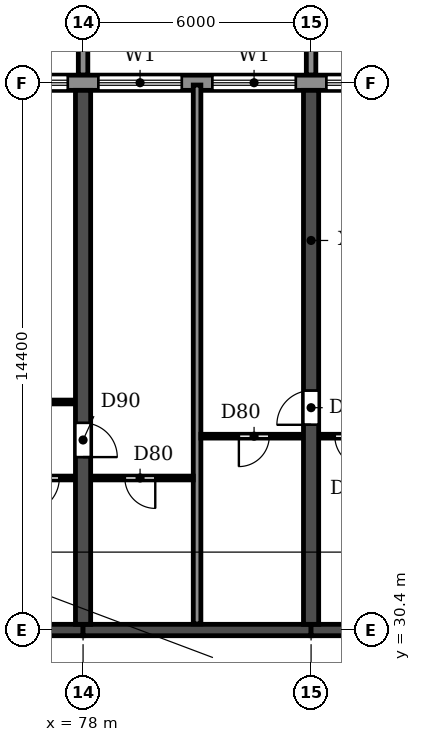
"""IFC4 building model, lengths in metres.
Left out: names, types, materials, properties, quantities, classifications, styles, units other than length and angle.
Written with IfcOpenShell. Run it as: python <this file> out.ifc"""

import sys

from ifc_helpers import new_model, si_unit, direction, frame, frame_2d, origin, place, context, subcontext, project, spatial, polyline, rectangle, outline, extrude, source, transform, mapped, element, fill, save


model = new_model("IFC4")
c1 = context("Model", 3, precision=1e-05, world=origin(), true_north=direction((0.0, 1.0)))
c2 = subcontext(c1, "Body", "Model", "MODEL_VIEW")
j1 = project(units=[si_unit("LENGTHUNIT", "METRE"), si_unit("PLANEANGLEUNIT", "RADIAN")], contexts=[c1])
p1 = place(None, origin())
s1 = spatial("IfcSite", under=j1, at=p1, CompositionType="ELEMENT")
p2 = place(p1, origin())
s2 = spatial("IfcBuilding", under=s1, at=p2, CompositionType="ELEMENT")
p3 = place(p2, frame((0.0, 0.0, 43.2)))
s3 = spatial("IfcBuildingStorey", under=s2, at=p3, CompositionType="ELEMENT", Elevation=43.2)
p4 = place(p3, frame((78.0, 30.55, 0.0), z_axis=(0.0, 0.0, 1.0), x_axis=(0.0, 1.0, 0.0)))
e1 = element("IfcWall", 1, at=p4, inside=s3, PredefinedType="SHEAR", context=c2, shape_type="SweptSolid", body=[
    extrude(rectangle(XDim=14.05, YDim=0.4, at=frame_2d((7.025, 0.0))), origin(), (0.0, 0.0, 1.0), 3.05),
])
p5 = place(p4, frame((4.4, 0.0, 0.0)))
e2 = element("IfcOpeningElement", 2, at=p5, cuts=e1, PredefinedType="OPENING", context=c2, shape_type="SweptSolid", body=[
    extrude(rectangle(XDim=0.9, YDim=2.1, at=frame_2d((0.45, 1.05))), frame((0.0, 0.21, 0.0), z_axis=(0.0, -1.0, 0.0), x_axis=(1.0, 0.0, 0.0)), (0.0, 0.0, 1.0), 0.42),
])
p6 = place(p3, frame((84.0, 30.55, 0.0), z_axis=(0.0, 0.0, 1.0), x_axis=(0.0, 1.0, 0.0)))
e3 = element("IfcWall", 3, at=p6, inside=s3, PredefinedType="SHEAR", context=c2, shape_type="SweptSolid", body=[
    extrude(rectangle(XDim=14.05, YDim=0.4, at=frame_2d((7.025, 0.0))), origin(), (0.0, 0.0, 1.0), 3.05),
])
p7 = place(p6, frame((5.25, 0.0, 0.0)))
e4 = element("IfcOpeningElement", 4, at=p7, cuts=e3, PredefinedType="OPENING", context=c2, shape_type="SweptSolid", body=[
    extrude(rectangle(XDim=0.9, YDim=2.1, at=frame_2d((0.45, 1.05))), frame((0.0, 0.21, 0.0), z_axis=(0.0, -1.0, 0.0), x_axis=(1.0, 0.0, 0.0)), (0.0, 0.0, 1.0), 0.42),
])
p8 = place(p3, frame((72.0, 30.4, 0.0), z_axis=(0.0, 0.0, 1.0), x_axis=(1.0, 0.0, 0.0)))
e5 = element("IfcWall", 5, at=p8, inside=s3, PredefinedType="SHEAR", context=c2, shape_type="SweptSolid", body=[
    extrude(rectangle(XDim=6.0, YDim=0.3, at=frame_2d((3.0, 0.0))), origin(), (0.0, 0.0, 1.0), 2.45),
])
p9 = place(p8, frame((2.45, 0.0, 0.0)))
e6 = element("IfcOpeningElement", 6, at=p9, cuts=e5, PredefinedType="OPENING", context=c2, shape_type="SweptSolid", body=[
    extrude(rectangle(XDim=1.0, YDim=2.1, at=frame_2d((0.5, 1.05))), frame((0.0, 0.16, 0.0), z_axis=(0.0, -1.0, 0.0), x_axis=(1.0, 0.0, 0.0)), (0.0, 0.0, 1.0), 0.32),
])
p10 = place(p3, frame((78.0, 30.4, 0.0), z_axis=(0.0, 0.0, 1.0), x_axis=(1.0, 0.0, 0.0)))
e7 = element("IfcWall", 7, at=p10, inside=s3, PredefinedType="SHEAR", context=c2, shape_type="SweptSolid", body=[
    extrude(rectangle(XDim=6.0, YDim=0.3, at=frame_2d((3.0, 0.0))), origin(), (0.0, 0.0, 1.0), 2.45),
])
p11 = place(p3, frame((84.0, 30.4, 0.0), z_axis=(0.0, 0.0, 1.0), x_axis=(1.0, 0.0, 0.0)))
e8 = element("IfcWall", 8, at=p11, inside=s3, PredefinedType="SHEAR", context=c2, shape_type="SweptSolid", body=[
    extrude(rectangle(XDim=6.0, YDim=0.3, at=frame_2d((3.0, 0.0))), origin(), (0.0, 0.0, 1.0), 2.45),
])
p12 = place(p11, frame((2.45, 0.0, 0.0)))
e9 = element("IfcOpeningElement", 9, at=p12, cuts=e8, PredefinedType="OPENING", context=c2, shape_type="SweptSolid", body=[
    extrude(rectangle(XDim=1.0, YDim=2.1, at=frame_2d((0.5, 1.05))), frame((0.0, 0.16, 0.0), z_axis=(0.0, -1.0, 0.0), x_axis=(1.0, 0.0, 0.0)), (0.0, 0.0, 1.0), 0.32),
])
p13 = place(p3, frame((97.317, 44.8, 0.0), z_axis=(0.0, 0.0, 1.0), x_axis=(-1.0, 0.0, 0.0)))
e10 = element("IfcWall", 10, at=p13, inside=s3, PredefinedType="STANDARD", context=c2, shape_type="SweptSolid", body=[
    extrude(rectangle(XDim=92.634, YDim=0.4, at=frame_2d((46.317, 0.0))), origin(), (0.0, 0.0, 1.0), 3.05),
])
p14 = place(p13, frame((88.917, 0.0, 0.0)))
e11 = element("IfcOpeningElement", 11, at=p14, cuts=e10, PredefinedType="OPENING", context=c2, shape_type="SweptSolid", body=[
    extrude(rectangle(XDim=1.8, YDim=2.4, at=frame_2d((0.9, 1.2))), frame((0.0, 0.21, 0.0), z_axis=(0.0, -1.0, 0.0), x_axis=(1.0, 0.0, 0.0)), (0.0, 0.0, 1.0), 0.42),
])
p15 = place(p13, frame((85.717, 0.0, 0.9)))
e12 = element("IfcOpeningElement", 12, at=p15, cuts=e10, PredefinedType="OPENING", context=c2, shape_type="SweptSolid", body=[
    extrude(rectangle(XDim=2.2, YDim=1.5, at=frame_2d((1.1, 0.75))), frame((0.0, 0.21, 0.0), z_axis=(0.0, -1.0, 0.0), x_axis=(1.0, 0.0, 0.0)), (0.0, 0.0, 1.0), 0.42),
])
p16 = place(p13, frame((82.717, 0.0, 0.9)))
e13 = element("IfcOpeningElement", 13, at=p16, cuts=e10, PredefinedType="OPENING", context=c2, shape_type="SweptSolid", body=[
    extrude(rectangle(XDim=2.2, YDim=1.5, at=frame_2d((1.1, 0.75))), frame((0.0, 0.21, 0.0), z_axis=(0.0, -1.0, 0.0), x_axis=(1.0, 0.0, 0.0)), (0.0, 0.0, 1.0), 0.42),
])
p17 = place(p13, frame((79.717, 0.0, 0.9)))
e14 = element("IfcOpeningElement", 14, at=p17, cuts=e10, PredefinedType="OPENING", context=c2, shape_type="SweptSolid", body=[
    extrude(rectangle(XDim=2.2, YDim=1.5, at=frame_2d((1.1, 0.75))), frame((0.0, 0.21, 0.0), z_axis=(0.0, -1.0, 0.0), x_axis=(1.0, 0.0, 0.0)), (0.0, 0.0, 1.0), 0.42),
])
p18 = place(p13, frame((76.717, 0.0, 0.9)))
e15 = element("IfcOpeningElement", 15, at=p18, cuts=e10, PredefinedType="OPENING", context=c2, shape_type="SweptSolid", body=[
    extrude(rectangle(XDim=2.2, YDim=1.5, at=frame_2d((1.1, 0.75))), frame((0.0, 0.21, 0.0), z_axis=(0.0, -1.0, 0.0), x_axis=(1.0, 0.0, 0.0)), (0.0, 0.0, 1.0), 0.42),
])
p19 = place(p13, frame((73.917, 0.0, 0.0)))
e16 = element("IfcOpeningElement", 16, at=p19, cuts=e10, PredefinedType="OPENING", context=c2, shape_type="SweptSolid", body=[
    extrude(rectangle(XDim=1.8, YDim=2.4, at=frame_2d((0.9, 1.2))), frame((0.0, 0.21, 0.0), z_axis=(0.0, -1.0, 0.0), x_axis=(1.0, 0.0, 0.0)), (0.0, 0.0, 1.0), 0.42),
])
p20 = place(p13, frame((70.717, 0.0, 0.9)))
e17 = element("IfcOpeningElement", 17, at=p20, cuts=e10, PredefinedType="OPENING", context=c2, shape_type="SweptSolid", body=[
    extrude(rectangle(XDim=2.2, YDim=1.5, at=frame_2d((1.1, 0.75))), frame((0.0, 0.21, 0.0), z_axis=(0.0, -1.0, 0.0), x_axis=(1.0, 0.0, 0.0)), (0.0, 0.0, 1.0), 0.42),
])
p21 = place(p13, frame((67.717, 0.0, 0.9)))
e18 = element("IfcOpeningElement", 18, at=p21, cuts=e10, PredefinedType="OPENING", context=c2, shape_type="SweptSolid", body=[
    extrude(rectangle(XDim=2.2, YDim=1.5, at=frame_2d((1.1, 0.75))), frame((0.0, 0.21, 0.0), z_axis=(0.0, -1.0, 0.0), x_axis=(1.0, 0.0, 0.0)), (0.0, 0.0, 1.0), 0.42),
])
p22 = place(p13, frame((64.717, 0.0, 0.9)))
e19 = element("IfcOpeningElement", 19, at=p22, cuts=e10, PredefinedType="OPENING", context=c2, shape_type="SweptSolid", body=[
    extrude(rectangle(XDim=2.2, YDim=1.5, at=frame_2d((1.1, 0.75))), frame((0.0, 0.21, 0.0), z_axis=(0.0, -1.0, 0.0), x_axis=(1.0, 0.0, 0.0)), (0.0, 0.0, 1.0), 0.42),
])
p23 = place(p13, frame((61.917, 0.0, 0.0)))
e20 = element("IfcOpeningElement", 20, at=p23, cuts=e10, PredefinedType="OPENING", context=c2, shape_type="SweptSolid", body=[
    extrude(rectangle(XDim=1.8, YDim=2.4, at=frame_2d((0.9, 1.2))), frame((0.0, 0.21, 0.0), z_axis=(0.0, -1.0, 0.0), x_axis=(1.0, 0.0, 0.0)), (0.0, 0.0, 1.0), 0.42),
])
p24 = place(p13, frame((58.717, 0.0, 0.9)))
e21 = element("IfcOpeningElement", 21, at=p24, cuts=e10, PredefinedType="OPENING", context=c2, shape_type="SweptSolid", body=[
    extrude(rectangle(XDim=2.2, YDim=1.5, at=frame_2d((1.1, 0.75))), frame((0.0, 0.21, 0.0), z_axis=(0.0, -1.0, 0.0), x_axis=(1.0, 0.0, 0.0)), (0.0, 0.0, 1.0), 0.42),
])
p25 = place(p13, frame((55.717, 0.0, 0.9)))
e22 = element("IfcOpeningElement", 22, at=p25, cuts=e10, PredefinedType="OPENING", context=c2, shape_type="SweptSolid", body=[
    extrude(rectangle(XDim=2.2, YDim=1.5, at=frame_2d((1.1, 0.75))), frame((0.0, 0.21, 0.0), z_axis=(0.0, -1.0, 0.0), x_axis=(1.0, 0.0, 0.0)), (0.0, 0.0, 1.0), 0.42),
])
p26 = place(p13, frame((52.717, 0.0, 0.9)))
e23 = element("IfcOpeningElement", 23, at=p26, cuts=e10, PredefinedType="OPENING", context=c2, shape_type="SweptSolid", body=[
    extrude(rectangle(XDim=2.2, YDim=1.5, at=frame_2d((1.1, 0.75))), frame((0.0, 0.21, 0.0), z_axis=(0.0, -1.0, 0.0), x_axis=(1.0, 0.0, 0.0)), (0.0, 0.0, 1.0), 0.42),
])
p27 = place(p13, frame((49.917, 0.0, 0.0)))
e24 = element("IfcOpeningElement", 24, at=p27, cuts=e10, PredefinedType="OPENING", context=c2, shape_type="SweptSolid", body=[
    extrude(rectangle(XDim=1.8, YDim=2.4, at=frame_2d((0.9, 1.2))), frame((0.0, 0.21, 0.0), z_axis=(0.0, -1.0, 0.0), x_axis=(1.0, 0.0, 0.0)), (0.0, 0.0, 1.0), 0.42),
])
p28 = place(p13, frame((46.717, 0.0, 0.9)))
e25 = element("IfcOpeningElement", 25, at=p28, cuts=e10, PredefinedType="OPENING", context=c2, shape_type="SweptSolid", body=[
    extrude(rectangle(XDim=2.2, YDim=1.5, at=frame_2d((1.1, 0.75))), frame((0.0, 0.21, 0.0), z_axis=(0.0, -1.0, 0.0), x_axis=(1.0, 0.0, 0.0)), (0.0, 0.0, 1.0), 0.42),
])
p29 = place(p13, frame((43.717, 0.0, 0.9)))
e26 = element("IfcOpeningElement", 26, at=p29, cuts=e10, PredefinedType="OPENING", context=c2, shape_type="SweptSolid", body=[
    extrude(rectangle(XDim=2.2, YDim=1.5, at=frame_2d((1.1, 0.75))), frame((0.0, 0.21, 0.0), z_axis=(0.0, -1.0, 0.0), x_axis=(1.0, 0.0, 0.0)), (0.0, 0.0, 1.0), 0.42),
])
p30 = place(p13, frame((40.717, 0.0, 0.9)))
e27 = element("IfcOpeningElement", 27, at=p30, cuts=e10, PredefinedType="OPENING", context=c2, shape_type="SweptSolid", body=[
    extrude(rectangle(XDim=2.2, YDim=1.5, at=frame_2d((1.1, 0.75))), frame((0.0, 0.21, 0.0), z_axis=(0.0, -1.0, 0.0), x_axis=(1.0, 0.0, 0.0)), (0.0, 0.0, 1.0), 0.42),
])
p31 = place(p13, frame((37.917, 0.0, 0.0)))
e28 = element("IfcOpeningElement", 28, at=p31, cuts=e10, PredefinedType="OPENING", context=c2, shape_type="SweptSolid", body=[
    extrude(rectangle(XDim=1.8, YDim=2.4, at=frame_2d((0.9, 1.2))), frame((0.0, 0.21, 0.0), z_axis=(0.0, -1.0, 0.0), x_axis=(1.0, 0.0, 0.0)), (0.0, 0.0, 1.0), 0.42),
])
p32 = place(p13, frame((34.717, 0.0, 0.9)))
e29 = element("IfcOpeningElement", 29, at=p32, cuts=e10, PredefinedType="OPENING", context=c2, shape_type="SweptSolid", body=[
    extrude(rectangle(XDim=2.2, YDim=1.5, at=frame_2d((1.1, 0.75))), frame((0.0, 0.21, 0.0), z_axis=(0.0, -1.0, 0.0), x_axis=(1.0, 0.0, 0.0)), (0.0, 0.0, 1.0), 0.42),
])
p33 = place(p13, frame((31.717, 0.0, 0.9)))
e30 = element("IfcOpeningElement", 30, at=p33, cuts=e10, PredefinedType="OPENING", context=c2, shape_type="SweptSolid", body=[
    extrude(rectangle(XDim=2.2, YDim=1.5, at=frame_2d((1.1, 0.75))), frame((0.0, 0.21, 0.0), z_axis=(0.0, -1.0, 0.0), x_axis=(1.0, 0.0, 0.0)), (0.0, 0.0, 1.0), 0.42),
])
p34 = place(p13, frame((28.717, 0.0, 0.9)))
e31 = element("IfcOpeningElement", 31, at=p34, cuts=e10, PredefinedType="OPENING", context=c2, shape_type="SweptSolid", body=[
    extrude(rectangle(XDim=2.2, YDim=1.5, at=frame_2d((1.1, 0.75))), frame((0.0, 0.21, 0.0), z_axis=(0.0, -1.0, 0.0), x_axis=(1.0, 0.0, 0.0)), (0.0, 0.0, 1.0), 0.42),
])
p35 = place(p13, frame((25.917, 0.0, 0.0)))
e32 = element("IfcOpeningElement", 32, at=p35, cuts=e10, PredefinedType="OPENING", context=c2, shape_type="SweptSolid", body=[
    extrude(rectangle(XDim=1.8, YDim=2.4, at=frame_2d((0.9, 1.2))), frame((0.0, 0.21, 0.0), z_axis=(0.0, -1.0, 0.0), x_axis=(1.0, 0.0, 0.0)), (0.0, 0.0, 1.0), 0.42),
])
p36 = place(p13, frame((22.917, 0.0, 0.0)))
e33 = element("IfcOpeningElement", 33, at=p36, cuts=e10, PredefinedType="OPENING", context=c2, shape_type="SweptSolid", body=[
    extrude(rectangle(XDim=1.8, YDim=2.4, at=frame_2d((0.9, 1.2))), frame((0.0, 0.21, 0.0), z_axis=(0.0, -1.0, 0.0), x_axis=(1.0, 0.0, 0.0)), (0.0, 0.0, 1.0), 0.42),
])
p37 = place(p13, frame((19.717, 0.0, 0.9)))
e34 = element("IfcOpeningElement", 34, at=p37, cuts=e10, PredefinedType="OPENING", context=c2, shape_type="SweptSolid", body=[
    extrude(rectangle(XDim=2.2, YDim=1.5, at=frame_2d((1.1, 0.75))), frame((0.0, 0.21, 0.0), z_axis=(0.0, -1.0, 0.0), x_axis=(1.0, 0.0, 0.0)), (0.0, 0.0, 1.0), 0.42),
])
p38 = place(p13, frame((16.717, 0.0, 0.9)))
e35 = element("IfcOpeningElement", 35, at=p38, cuts=e10, PredefinedType="OPENING", context=c2, shape_type="SweptSolid", body=[
    extrude(rectangle(XDim=2.2, YDim=1.5, at=frame_2d((1.1, 0.75))), frame((0.0, 0.21, 0.0), z_axis=(0.0, -1.0, 0.0), x_axis=(1.0, 0.0, 0.0)), (0.0, 0.0, 1.0), 0.42),
])
p39 = place(p13, frame((13.717, 0.0, 0.9)))
e36 = element("IfcOpeningElement", 36, at=p39, cuts=e10, PredefinedType="OPENING", context=c2, shape_type="SweptSolid", body=[
    extrude(rectangle(XDim=2.2, YDim=1.5, at=frame_2d((1.1, 0.75))), frame((0.0, 0.21, 0.0), z_axis=(0.0, -1.0, 0.0), x_axis=(1.0, 0.0, 0.0)), (0.0, 0.0, 1.0), 0.42),
])
p40 = place(p13, frame((10.717, 0.0, 0.9)))
e37 = element("IfcOpeningElement", 37, at=p40, cuts=e10, PredefinedType="OPENING", context=c2, shape_type="SweptSolid", body=[
    extrude(rectangle(XDim=2.2, YDim=1.5, at=frame_2d((1.1, 0.75))), frame((0.0, 0.21, 0.0), z_axis=(0.0, -1.0, 0.0), x_axis=(1.0, 0.0, 0.0)), (0.0, 0.0, 1.0), 0.42),
])
p41 = place(p13, frame((7.917, 0.0, 0.0)))
e38 = element("IfcOpeningElement", 38, at=p41, cuts=e10, PredefinedType="OPENING", context=c2, shape_type="SweptSolid", body=[
    extrude(rectangle(XDim=1.8, YDim=2.4, at=frame_2d((0.9, 1.2))), frame((0.0, 0.21, 0.0), z_axis=(0.0, -1.0, 0.0), x_axis=(1.0, 0.0, 0.0)), (0.0, 0.0, 1.0), 0.42),
])
p42 = place(p13, frame((4.717, 0.0, 0.9)))
e39 = element("IfcOpeningElement", 39, at=p42, cuts=e10, PredefinedType="OPENING", context=c2, shape_type="SweptSolid", body=[
    extrude(rectangle(XDim=2.2, YDim=1.5, at=frame_2d((1.1, 0.75))), frame((0.0, 0.21, 0.0), z_axis=(0.0, -1.0, 0.0), x_axis=(1.0, 0.0, 0.0)), (0.0, 0.0, 1.0), 0.42),
])
p43 = place(p13, frame((1.917, 0.0, 0.0)))
e40 = element("IfcOpeningElement", 40, at=p43, cuts=e10, PredefinedType="OPENING", context=c2, shape_type="SweptSolid", body=[
    extrude(rectangle(XDim=1.8, YDim=2.4, at=frame_2d((0.9, 1.2))), frame((0.0, 0.21, 0.0), z_axis=(0.0, -1.0, 0.0), x_axis=(1.0, 0.0, 0.0)), (0.0, 0.0, 1.0), 0.42),
])
m1 = source(origin(), c2, "Body", "SweptSolid", [
    extrude(outline(polyline([(0.0, 0.0), (0.25, 0.0), (0.25, 3.1), (0.0, 3.1), (0.0, 0.0)])), origin(), (0.0, 0.0, 1.0), 3.1),
])
for number, where in (
    (41, (77.875, 45.0, 0.0)),
    (42, (83.875, 45.0, 0.0)),
):
    element("IfcWall", number, at=place(p3, frame(where)), inside=s3, PredefinedType="STANDARD", context=c2, shape_type="MappedRepresentation", body=[
        mapped(m1, transform((0.0, 0.0, 0.0))),
    ])
p44 = place(p3, frame((81.0, 30.56, 0.0), z_axis=(0.0, 0.0, 1.0), x_axis=(0.0, 1.0, 0.0)))
e43 = element("IfcWall", 43, at=p44, inside=s3, PredefinedType="PARTITIONING", context=c2, shape_type="SweptSolid", body=[
    extrude(rectangle(XDim=14.18, YDim=0.2, at=frame_2d((7.09, 0.0))), origin(), (0.0, 0.0, 1.0), 3.05),
])
p45 = place(p3, frame((75.8, 34.4, 0.0), z_axis=(0.0, 0.0, 1.0), x_axis=(1.0, 0.0, 0.0)))
e44 = element("IfcWall", 44, at=p45, inside=s3, PredefinedType="PARTITIONING", context=c2, shape_type="SweptSolid", body=[
    extrude(rectangle(XDim=1.99, YDim=0.1, at=frame_2d((0.995, 0.0))), origin(), (0.0, 0.0, 1.0), 3.05),
])
p46 = place(p45, frame((0.675, 0.0, 0.0)))
e45 = element("IfcOpeningElement", 45, at=p46, cuts=e44, PredefinedType="OPENING", context=c2, shape_type="SweptSolid", body=[
    extrude(rectangle(XDim=0.9, YDim=2.1, at=frame_2d((0.45, 1.05))), frame((0.0, 0.06, 0.0), z_axis=(0.0, -1.0, 0.0), x_axis=(1.0, 0.0, 0.0)), (0.0, 0.0, 1.0), 0.12),
])
p47 = place(p3, frame((78.21, 34.4, 0.0), z_axis=(0.0, 0.0, 1.0), x_axis=(1.0, 0.0, 0.0)))
e46 = element("IfcWall", 46, at=p47, inside=s3, PredefinedType="PARTITIONING", context=c2, shape_type="SweptSolid", body=[
    extrude(rectangle(XDim=2.69, YDim=0.1, at=frame_2d((1.345, 0.0))), origin(), (0.0, 0.0, 1.0), 3.05),
])
p48 = place(p47, frame((0.89, 0.0, 0.0)))
e47 = element("IfcOpeningElement", 47, at=p48, cuts=e46, PredefinedType="OPENING", context=c2, shape_type="SweptSolid", body=[
    extrude(rectangle(XDim=0.8, YDim=2.1, at=frame_2d((0.4, 1.05))), frame((0.0, 0.06, 0.0), z_axis=(0.0, -1.0, 0.0), x_axis=(1.0, 0.0, 0.0)), (0.0, 0.0, 1.0), 0.12),
])
p49 = place(p3, frame((81.1, 35.5, 0.0), z_axis=(0.0, 0.0, 1.0), x_axis=(1.0, 0.0, 0.0)))
e48 = element("IfcWall", 48, at=p49, inside=s3, PredefinedType="PARTITIONING", context=c2, shape_type="SweptSolid", body=[
    extrude(rectangle(XDim=2.69, YDim=0.1, at=frame_2d((1.345, 0.0))), origin(), (0.0, 0.0, 1.0), 3.05),
])
p50 = place(p49, frame((1.0, 0.0, 0.0)))
e49 = element("IfcOpeningElement", 49, at=p50, cuts=e48, PredefinedType="OPENING", context=c2, shape_type="SweptSolid", body=[
    extrude(rectangle(XDim=0.8, YDim=2.1, at=frame_2d((0.4, 1.05))), frame((0.0, 0.06, 0.0), z_axis=(0.0, -1.0, 0.0), x_axis=(1.0, 0.0, 0.0)), (0.0, 0.0, 1.0), 0.12),
])
p51 = place(p3, frame((84.21, 35.5, 0.0), z_axis=(0.0, 0.0, 1.0), x_axis=(1.0, 0.0, 0.0)))
e50 = element("IfcWall", 50, at=p51, inside=s3, PredefinedType="PARTITIONING", context=c2, shape_type="SweptSolid", body=[
    extrude(rectangle(XDim=1.89, YDim=0.1, at=frame_2d((0.945, 0.0))), origin(), (0.0, 0.0, 1.0), 3.05),
])
p52 = place(p51, frame((0.415, 0.0, 0.0)))
e51 = element("IfcOpeningElement", 51, at=p52, cuts=e50, PredefinedType="OPENING", context=c2, shape_type="SweptSolid", body=[
    extrude(rectangle(XDim=0.8, YDim=2.1, at=frame_2d((0.4, 1.05))), frame((0.0, 0.06, 0.0), z_axis=(0.0, -1.0, 0.0), x_axis=(1.0, 0.0, 0.0)), (0.0, 0.0, 1.0), 0.12),
])
p53 = place(p3, frame((74.95, 36.4, 0.0), z_axis=(0.0, 0.0, 1.0), x_axis=(1.0, 0.0, 0.0)))
e52 = element("IfcWall", 52, at=p53, inside=s3, PredefinedType="PARTITIONING", context=c2, shape_type="SweptSolid", body=[
    extrude(rectangle(XDim=2.84, YDim=0.1, at=frame_2d((1.42, 0.0))), origin(), (0.0, 0.0, 1.0), 3.05),
])
p54 = place(p53, frame((0.55, 0.0, 0.0)))
e53 = element("IfcOpeningElement", 53, at=p54, cuts=e52, PredefinedType="OPENING", context=c2, shape_type="SweptSolid", body=[
    extrude(rectangle(XDim=0.9, YDim=2.1, at=frame_2d((0.45, 1.05))), frame((0.0, 0.06, 0.0), z_axis=(0.0, -1.0, 0.0), x_axis=(1.0, 0.0, 0.0)), (0.0, 0.0, 1.0), 0.12),
])
p55 = place(p37, origin())
e54 = element("IfcWindow", 54, at=p55, inside=s3, PartitioningType="DOUBLE_PANEL_HORIZONTAL", PredefinedType="WINDOW", context=c2, shape_type="SweptSolid", body=[
    extrude(rectangle(XDim=2.2, YDim=1.5, at=frame_2d((1.1, 0.75))), frame((0.0, 0.03, 0.0), z_axis=(0.0, -1.0, 0.0), x_axis=(1.0, 0.0, 0.0)), (0.0, 0.0, 1.0), 0.06),
])
fill(e34, e54)
p56 = place(p38, origin())
e55 = element("IfcWindow", 55, at=p56, inside=s3, PartitioningType="DOUBLE_PANEL_HORIZONTAL", PredefinedType="WINDOW", context=c2, shape_type="SweptSolid", body=[
    extrude(rectangle(XDim=2.2, YDim=1.5, at=frame_2d((1.1, 0.75))), frame((0.0, 0.03, 0.0), z_axis=(0.0, -1.0, 0.0), x_axis=(1.0, 0.0, 0.0)), (0.0, 0.0, 1.0), 0.06),
])
fill(e35, e55)
p57 = place(p39, origin())
e56 = element("IfcWindow", 56, at=p57, inside=s3, PartitioningType="DOUBLE_PANEL_HORIZONTAL", PredefinedType="WINDOW", context=c2, shape_type="SweptSolid", body=[
    extrude(rectangle(XDim=2.2, YDim=1.5, at=frame_2d((1.1, 0.75))), frame((0.0, 0.03, 0.0), z_axis=(0.0, -1.0, 0.0), x_axis=(1.0, 0.0, 0.0)), (0.0, 0.0, 1.0), 0.06),
])
fill(e36, e56)
p58 = place(p40, origin())
e57 = element("IfcWindow", 57, at=p58, inside=s3, PartitioningType="DOUBLE_PANEL_HORIZONTAL", PredefinedType="WINDOW", context=c2, shape_type="SweptSolid", body=[
    extrude(rectangle(XDim=2.2, YDim=1.5, at=frame_2d((1.1, 0.75))), frame((0.0, 0.03, 0.0), z_axis=(0.0, -1.0, 0.0), x_axis=(1.0, 0.0, 0.0)), (0.0, 0.0, 1.0), 0.06),
])
fill(e37, e57)
p59 = place(p48, frame((0.8, 0.0, 0.0), z_axis=(0.0, 0.0, 1.0), x_axis=(-1.0, 0.0, 0.0)))
e58 = element("IfcDoor", 58, at=p59, inside=s3, OperationType="SINGLE_SWING_LEFT", PredefinedType="DOOR", context=c2, shape_type="SweptSolid", body=[
    extrude(rectangle(XDim=0.8, YDim=2.1, at=frame_2d((0.4, 1.05))), frame((0.0, 0.025, 0.0), z_axis=(0.0, -1.0, 0.0), x_axis=(1.0, 0.0, 0.0)), (0.0, 0.0, 1.0), 0.05),
])
fill(e47, e58)
p60 = place(p46, frame((0.9, 0.0, 0.0), z_axis=(0.0, 0.0, 1.0), x_axis=(-1.0, 0.0, 0.0)))
e59 = element("IfcDoor", 59, at=p60, inside=s3, OperationType="SINGLE_SWING_RIGHT", PredefinedType="DOOR", context=c2, shape_type="SweptSolid", body=[
    extrude(rectangle(XDim=0.9, YDim=2.1, at=frame_2d((0.45, 1.05))), frame((0.0, 0.025, 0.0), z_axis=(0.0, -1.0, 0.0), x_axis=(1.0, 0.0, 0.0)), (0.0, 0.0, 1.0), 0.05),
])
fill(e45, e59)
p61 = place(p5, frame((0.9, 0.0, 0.0), z_axis=(0.0, 0.0, 1.0), x_axis=(-1.0, 0.0, 0.0)))
e60 = element("IfcDoor", 60, at=p61, inside=s3, OperationType="SINGLE_SWING_RIGHT", PredefinedType="DOOR", context=c2, shape_type="SweptSolid", body=[
    extrude(rectangle(XDim=0.9, YDim=2.1, at=frame_2d((0.45, 1.05))), frame((0.0, 0.025, 0.0), z_axis=(0.0, -1.0, 0.0), x_axis=(1.0, 0.0, 0.0)), (0.0, 0.0, 1.0), 0.05),
])
fill(e2, e60)
p62 = place(p50, frame((0.8, 0.0, 0.0), z_axis=(0.0, 0.0, 1.0), x_axis=(-1.0, 0.0, 0.0)))
e61 = element("IfcDoor", 61, at=p62, inside=s3, OperationType="SINGLE_SWING_RIGHT", PredefinedType="DOOR", context=c2, shape_type="SweptSolid", body=[
    extrude(rectangle(XDim=0.8, YDim=2.1, at=frame_2d((0.4, 1.05))), frame((0.0, 0.025, 0.0), z_axis=(0.0, -1.0, 0.0), x_axis=(1.0, 0.0, 0.0)), (0.0, 0.0, 1.0), 0.05),
])
fill(e49, e61)
p63 = place(p7, origin())
e62 = element("IfcDoor", 62, at=p63, inside=s3, OperationType="SINGLE_SWING_LEFT", PredefinedType="DOOR", context=c2, shape_type="SweptSolid", body=[
    extrude(rectangle(XDim=0.9, YDim=2.1, at=frame_2d((0.45, 1.05))), frame((0.0, 0.025, 0.0), z_axis=(0.0, -1.0, 0.0), x_axis=(1.0, 0.0, 0.0)), (0.0, 0.0, 1.0), 0.05),
])
fill(e4, e62)
p64 = place(p52, frame((0.8, 0.0, 0.0), z_axis=(0.0, 0.0, 1.0), x_axis=(-1.0, 0.0, 0.0)))
e63 = element("IfcDoor", 63, at=p64, inside=s3, OperationType="SINGLE_SWING_LEFT", PredefinedType="DOOR", context=c2, shape_type="SweptSolid", body=[
    extrude(rectangle(XDim=0.8, YDim=2.1, at=frame_2d((0.4, 1.05))), frame((0.0, 0.025, 0.0), z_axis=(0.0, -1.0, 0.0), x_axis=(1.0, 0.0, 0.0)), (0.0, 0.0, 1.0), 0.05),
])
fill(e51, e63)
save(model, sys.argv[1])
